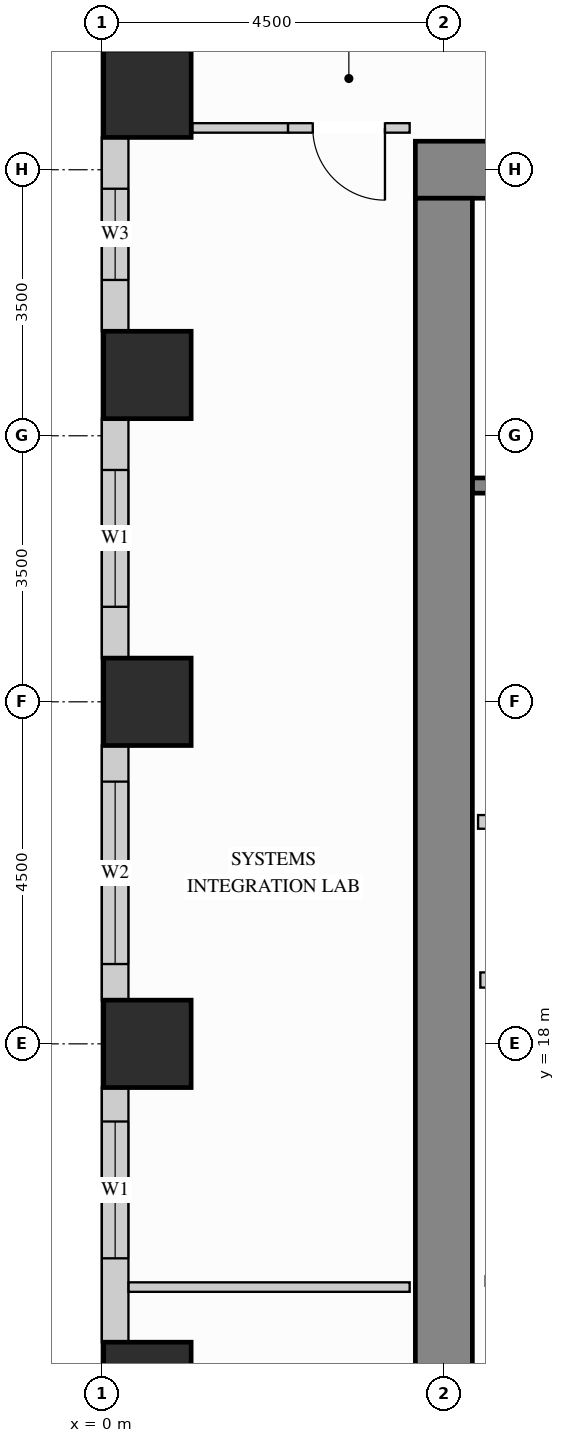
"""IFC4 building model, lengths in metres.
Left out: names, types, materials, properties, quantities, classifications, styles, units other than length and angle.
Written with IfcOpenShell. Run it as: python <this file> out.ifc"""

import sys

from ifc_helpers import new_model, si_unit, direction, frame, frame_2d, origin, origin_2d, place, context, subcontext, project, spatial, rectangle, extrude, source, transform, mapped, element, fill, save


model = new_model("IFC4")
c1 = context("Model", 3, precision=1e-05, world=origin(), true_north=direction((0.0, 1.0)))
c2 = subcontext(c1, "Body", "Model", "MODEL_VIEW")
j1 = project(units=[si_unit("LENGTHUNIT", "METRE"), si_unit("PLANEANGLEUNIT", "RADIAN")], contexts=[c1])
p1 = place(None, origin())
s1 = spatial("IfcSite", under=j1, at=p1, CompositionType="ELEMENT")
p2 = place(p1, origin())
s2 = spatial("IfcBuilding", under=s1, at=p2, CompositionType="ELEMENT")
p3 = place(p2, frame((0.0, 0.0, 102.6)))
s3 = spatial("IfcBuildingStorey", under=s2, at=p3, CompositionType="ELEMENT", Elevation=102.6)
m1 = source(origin(), c2, "Body", "SweptSolid", [
    extrude(rectangle(XDim=1.15, YDim=1.15, at=origin_2d()), origin(), (0.0, 0.0, 1.0), 3.38),
])
for number, where, z_axis, x_axis in (
    (1, (0.6, 13.5, 0.0), (0.0, 0.0, 1.0), (1.0, 0.0, 0.0)),
    (2, (0.6, 18.0, 0.0), (0.0, 0.0, 1.0), (1.0, 0.0, 0.0)),
    (3, (0.6, 22.5, 0.0), (0.0, 0.0, 1.0), (1.0, 0.0, 0.0)),
    (4, (0.6, 26.8, 0.0), (0.0, 0.0, 1.0), (1.0, 0.0, 0.0)),
    (5, (0.6, 30.5, 0.0), (0.0, 0.0, 1.0), (1.0, 0.0, 0.0)),
):
    element("IfcColumn", number, at=place(p3, frame(where, z_axis=z_axis, x_axis=x_axis)), inside=s3, PredefinedType="COLUMN", context=c2, shape_type="MappedRepresentation", body=[
        mapped(m1, transform((0.0, 0.0, 0.0), x_axis=(1.0, 0.0, 0.0), y_axis=(0.0, 1.0, 0.0), z_axis=(0.0, 0.0, 1.0))),
    ])
m2 = source(origin(), c2, "Body", "SweptSolid", [
    extrude(rectangle(XDim=10.75, YDim=0.75, at=frame_2d((5.375, 0.0))), origin(), (0.0, 0.0, 1.0), 3.38),
])
p4 = place(p3, frame((4.125, 29.5, 0.0), z_axis=(0.0, 0.0, 1.0), x_axis=(1.0, 0.0, 0.0)))
e6 = element("IfcWall", 6, at=p4, inside=s3, PredefinedType="SHEAR", context=c2, shape_type="MappedRepresentation", body=[
    mapped(m2, transform((0.0, 0.0, 0.0), x_axis=(1.0, 0.0, 0.0), y_axis=(0.0, 1.0, 0.0), z_axis=(0.0, 0.0, 1.0))),
])
m3 = source(origin(), c2, "Body", "SweptSolid", [
    extrude(rectangle(XDim=20.25, YDim=0.75, at=frame_2d((10.125, 0.0))), origin(), (0.0, 0.0, 1.0), 3.38),
])
p5 = place(p3, frame((4.5, 8.875, 0.0), z_axis=(0.0, 0.0, 1.0), x_axis=(0.0, 1.0, 0.0)))
e7 = element("IfcWall", 7, at=p5, inside=s3, PredefinedType="SHEAR", context=c2, shape_type="MappedRepresentation", body=[
    mapped(m3, transform((0.0, 0.0, 0.0), x_axis=(1.0, 0.0, 0.0), y_axis=(0.0, 1.0, 0.0), z_axis=(0.0, 0.0, 1.0))),
])
p6 = place(p3, frame((0.175, 29.927, 0.0), z_axis=(0.0, 0.0, 1.0), x_axis=(0.0, -1.0, 0.0)))
e8 = element("IfcWall", 8, at=p6, inside=s3, PredefinedType="SOLIDWALL", context=c2, shape_type="SweptSolid", body=[
    extrude(rectangle(XDim=2.554, YDim=0.35, at=frame_2d((1.277, 0.0))), origin(), (0.0, 0.0, 1.0), 3.365),
])
p7 = place(p6, frame((0.677, 0.0, 0.78)))
e9 = element("IfcOpeningElement", 9, at=p7, cuts=e8, PredefinedType="OPENING", context=c2, shape_type="SweptSolid", body=[
    extrude(rectangle(XDim=1.2, YDim=2.1, at=frame_2d((0.6, 1.05))), frame((0.0, 0.185, 0.0), z_axis=(0.0, -1.0, 0.0), x_axis=(1.0, 0.0, 0.0)), (0.0, 0.0, 1.0), 0.37),
])
p8 = place(p3, frame((0.175, 26.227, 0.0), z_axis=(0.0, 0.0, 1.0), x_axis=(0.0, -1.0, 0.0)))
e10 = element("IfcWall", 10, at=p8, inside=s3, PredefinedType="SOLIDWALL", context=c2, shape_type="SweptSolid", body=[
    extrude(rectangle(XDim=3.154, YDim=0.35, at=frame_2d((1.577, 0.0))), origin(), (0.0, 0.0, 1.0), 3.365),
])
p9 = place(p8, frame((0.677, 0.0, 0.78)))
e11 = element("IfcOpeningElement", 11, at=p9, cuts=e10, PredefinedType="OPENING", context=c2, shape_type="SweptSolid", body=[
    extrude(rectangle(XDim=1.8, YDim=2.1, at=frame_2d((0.9, 1.05))), frame((0.0, 0.185, 0.0), z_axis=(0.0, -1.0, 0.0), x_axis=(1.0, 0.0, 0.0)), (0.0, 0.0, 1.0), 0.37),
])
p10 = place(p3, frame((0.175, 21.927, 0.0), z_axis=(0.0, 0.0, 1.0), x_axis=(0.0, -1.0, 0.0)))
e12 = element("IfcWall", 12, at=p10, inside=s3, PredefinedType="SOLIDWALL", context=c2, shape_type="SweptSolid", body=[
    extrude(rectangle(XDim=3.354, YDim=0.35, at=frame_2d((1.677, 0.0))), origin(), (0.0, 0.0, 1.0), 3.365),
])
p11 = place(p10, frame((0.477, 0.0, 0.78)))
e13 = element("IfcOpeningElement", 13, at=p11, cuts=e12, PredefinedType="OPENING", context=c2, shape_type="SweptSolid", body=[
    extrude(rectangle(XDim=2.4, YDim=2.1, at=frame_2d((1.2, 1.05))), frame((0.0, 0.185, 0.0), z_axis=(0.0, -1.0, 0.0), x_axis=(1.0, 0.0, 0.0)), (0.0, 0.0, 1.0), 0.37),
])
p12 = place(p3, frame((0.175, 17.427, 0.0), z_axis=(0.0, 0.0, 1.0), x_axis=(0.0, -1.0, 0.0)))
e14 = element("IfcWall", 14, at=p12, inside=s3, PredefinedType="SOLIDWALL", context=c2, shape_type="SweptSolid", body=[
    extrude(rectangle(XDim=3.354, YDim=0.35, at=frame_2d((1.677, 0.0))), origin(), (0.0, 0.0, 1.0), 3.365),
])
p13 = place(p12, frame((0.448, 0.0, 0.78)))
e15 = element("IfcOpeningElement", 15, at=p13, cuts=e14, PredefinedType="OPENING", context=c2, shape_type="SweptSolid", body=[
    extrude(rectangle(XDim=1.8, YDim=2.1, at=frame_2d((0.9, 1.05))), frame((0.0, 0.185, 0.0), z_axis=(0.0, -1.0, 0.0), x_axis=(1.0, 0.0, 0.0)), (0.0, 0.0, 1.0), 0.37),
])
m4 = source(origin(), c2, "Body", "SweptSolid", [
    extrude(rectangle(XDim=2.2, YDim=0.18, at=frame_2d((1.1, 0.0))), origin(), (0.0, 0.0, 1.0), 3.365),
])
p14 = place(p3, frame((4.95, 20.92, 0.0), z_axis=(0.0, 0.0, 1.0), x_axis=(1.0, 0.0, 0.0)))
e16 = element("IfcWall", 16, at=p14, inside=s3, PredefinedType="PARTITIONING", context=c2, shape_type="MappedRepresentation", body=[
    mapped(m4, transform((0.0, 0.0, 0.0), x_axis=(1.0, 0.0, 0.0), y_axis=(0.0, 1.0, 0.0), z_axis=(0.0, 0.0, 1.0))),
])
p15 = place(p3, frame((5.05, 14.88, 0.0), z_axis=(0.0, 0.0, 1.0), x_axis=(1.0, 0.0, 0.0)))
e17 = element("IfcWall", 17, at=p15, inside=s3, PredefinedType="PARTITIONING", context=c2, shape_type="SweptSolid", body=[
    extrude(rectangle(XDim=2.35, YDim=0.125, at=frame_2d((1.175, 0.0))), origin(), (0.0, 0.0, 1.0), 3.365),
])
p16 = place(p15, frame((0.7, 0.0, 0.0)))
e18 = element("IfcOpeningElement", 18, at=p16, cuts=e17, PredefinedType="OPENING", context=c2, shape_type="SweptSolid", body=[
    extrude(rectangle(XDim=0.85, YDim=2.1, at=frame_2d((0.425, 1.05))), frame((0.0, 0.073, 0.0), z_axis=(0.0, -1.0, 0.0), x_axis=(1.0, 0.0, 0.0)), (0.0, 0.0, 1.0), 0.145),
])
m5 = source(origin(), c2, "Body", "SweptSolid", [
    extrude(rectangle(XDim=1.26, YDim=0.125, at=frame_2d((0.63, 0.0))), origin(), (0.0, 0.0, 1.0), 3.365),
])
p17 = place(p3, frame((1.19, 30.05, 0.0), z_axis=(0.0, 0.0, 1.0), x_axis=(1.0, 0.0, 0.0)))
e19 = element("IfcWall", 19, at=p17, inside=s3, PredefinedType="PARTITIONING", context=c2, shape_type="MappedRepresentation", body=[
    mapped(m5, transform((0.0, 0.0, 0.0), x_axis=(1.0, 0.0, 0.0), y_axis=(0.0, 1.0, 0.0), z_axis=(0.0, 0.0, 1.0))),
])
p18 = place(p3, frame((2.45, 30.05, 0.0), z_axis=(0.0, 0.0, 1.0), x_axis=(1.0, 0.0, 0.0)))
e20 = element("IfcWall", 20, at=p18, inside=s3, PredefinedType="PARTITIONING", context=c2, shape_type="SweptSolid", body=[
    extrude(rectangle(XDim=1.6, YDim=0.125, at=frame_2d((0.8, 0.0))), origin(), (0.0, 0.0, 1.0), 3.365),
])
p19 = place(p18, frame((0.325, 0.0, 0.0)))
e21 = element("IfcOpeningElement", 21, at=p19, cuts=e20, PredefinedType="OPENING", context=c2, shape_type="SweptSolid", body=[
    extrude(rectangle(XDim=0.95, YDim=2.15, at=frame_2d((0.475, 1.075))), frame((0.0, 0.073, 0.0), z_axis=(0.0, -1.0, 0.0), x_axis=(1.0, 0.0, 0.0)), (0.0, 0.0, 1.0), 0.145),
])
m6 = source(origin(), c2, "Body", "SweptSolid", [
    extrude(rectangle(XDim=3.698, YDim=0.125, at=frame_2d((1.849, 0.0))), origin(), (0.0, 0.0, 1.0), 3.365),
])
p20 = place(p3, frame((0.352, 14.8, 0.0), z_axis=(0.0, 0.0, 1.0), x_axis=(1.0, 0.0, 0.0)))
e22 = element("IfcWall", 22, at=p20, inside=s3, PredefinedType="PARTITIONING", context=c2, shape_type="MappedRepresentation", body=[
    mapped(m6, transform((0.0, 0.0, 0.0), x_axis=(1.0, 0.0, 0.0), y_axis=(0.0, 1.0, 0.0), z_axis=(0.0, 0.0, 1.0))),
])
m7 = source(origin(), c2, "Body", "SweptSolid", [
    extrude(rectangle(XDim=2.09, YDim=0.2, at=frame_2d((1.045, 0.0))), origin(), (0.0, 0.0, 1.0), 3.365),
])
p21 = place(p3, frame((4.98, 18.84, 0.0), z_axis=(0.0, 0.0, 1.0), x_axis=(1.0, 0.0, 0.0)))
e23 = element("IfcWall", 23, at=p21, inside=s3, PredefinedType="PARTITIONING", context=c2, shape_type="MappedRepresentation", body=[
    mapped(m7, transform((0.0, 0.0, 0.0), x_axis=(1.0, 0.0, 0.0), y_axis=(0.0, 1.0, 0.0), z_axis=(0.0, 0.0, 1.0))),
])
p22 = place(p3, frame((4.877, 25.345, 0.0), z_axis=(0.0, 0.0, 1.0), x_axis=(1.0, 0.0, 0.0)))
e24 = element("IfcWall", 24, at=p22, inside=s3, PredefinedType="SHEAR", context=c2, shape_type="SweptSolid", body=[
    extrude(rectangle(XDim=7.528, YDim=0.2, at=frame_2d((3.764, 0.0))), origin(), (0.0, 0.0, 1.0), 3.38),
])
p23 = place(p22, frame((0.4, 0.0, 0.0)))
e25 = element("IfcOpeningElement", 25, at=p23, cuts=e24, PredefinedType="OPENING", context=c2, shape_type="SweptSolid", body=[
    extrude(rectangle(XDim=1.1, YDim=2.15, at=frame_2d((0.55, 1.075))), frame((0.0, 0.11, 0.0), z_axis=(0.0, -1.0, 0.0), x_axis=(1.0, 0.0, 0.0)), (0.0, 0.0, 1.0), 0.22),
])
m8 = source(origin(), c2, "Body", "SweptSolid", [
    extrude(rectangle(XDim=0.95, YDim=2.15, at=frame_2d((0.475, 1.075))), frame((0.0, 0.025, 0.0), z_axis=(0.0, -1.0, 0.0), x_axis=(1.0, 0.0, 0.0)), (0.0, 0.0, 1.0), 0.05),
])
p24 = place(p19, origin())
e26 = element("IfcDoor", 26, at=p24, inside=s3, OperationType="SINGLE_SWING_RIGHT", PredefinedType="DOOR", context=c2, shape_type="MappedRepresentation", body=[
    mapped(m8, transform((0.0, 0.0, 0.0), x_axis=(1.0, 0.0, 0.0), y_axis=(0.0, 1.0, 0.0), z_axis=(0.0, 0.0, 1.0))),
])
fill(e21, e26)
m9 = source(origin(), c2, "Body", "SweptSolid", [
    extrude(rectangle(XDim=1.8, YDim=2.1, at=frame_2d((0.9, 1.05))), frame((0.0, 0.03, 0.0), z_axis=(0.0, -1.0, 0.0), x_axis=(1.0, 0.0, 0.0)), (0.0, 0.0, 1.0), 0.06),
])
p25 = place(p9, origin())
e27 = element("IfcWindow", 27, at=p25, inside=s3, PartitioningType="SINGLE_PANEL", PredefinedType="WINDOW", context=c2, shape_type="MappedRepresentation", body=[
    mapped(m9, transform((0.0, 0.0, 0.0), x_axis=(1.0, 0.0, 0.0), y_axis=(0.0, 1.0, 0.0), z_axis=(0.0, 0.0, 1.0))),
])
fill(e11, e27)
p26 = place(p13, origin())
e28 = element("IfcWindow", 28, at=p26, inside=s3, PartitioningType="SINGLE_PANEL", PredefinedType="WINDOW", context=c2, shape_type="MappedRepresentation", body=[
    mapped(m9, transform((0.0, 0.0, 0.0), x_axis=(1.0, 0.0, 0.0), y_axis=(0.0, 1.0, 0.0), z_axis=(0.0, 0.0, 1.0))),
])
fill(e15, e28)
m10 = source(origin(), c2, "Body", "SweptSolid", [
    extrude(rectangle(XDim=2.4, YDim=2.1, at=frame_2d((1.2, 1.05))), frame((0.0, 0.03, 0.0), z_axis=(0.0, -1.0, 0.0), x_axis=(1.0, 0.0, 0.0)), (0.0, 0.0, 1.0), 0.06),
])
p27 = place(p11, origin())
e29 = element("IfcWindow", 29, at=p27, inside=s3, PartitioningType="SINGLE_PANEL", PredefinedType="WINDOW", context=c2, shape_type="MappedRepresentation", body=[
    mapped(m10, transform((0.0, 0.0, 0.0), x_axis=(1.0, 0.0, 0.0), y_axis=(0.0, 1.0, 0.0), z_axis=(0.0, 0.0, 1.0))),
])
fill(e13, e29)
m11 = source(origin(), c2, "Body", "SweptSolid", [
    extrude(rectangle(XDim=1.2, YDim=2.1, at=frame_2d((0.6, 1.05))), frame((0.0, 0.03, 0.0), z_axis=(0.0, -1.0, 0.0), x_axis=(1.0, 0.0, 0.0)), (0.0, 0.0, 1.0), 0.06),
])
p28 = place(p7, origin())
e30 = element("IfcWindow", 30, at=p28, inside=s3, PartitioningType="SINGLE_PANEL", PredefinedType="WINDOW", context=c2, shape_type="MappedRepresentation", body=[
    mapped(m11, transform((0.0, 0.0, 0.0), x_axis=(1.0, 0.0, 0.0), y_axis=(0.0, 1.0, 0.0), z_axis=(0.0, 0.0, 1.0))),
])
fill(e9, e30)
save(model, sys.argv[1])
